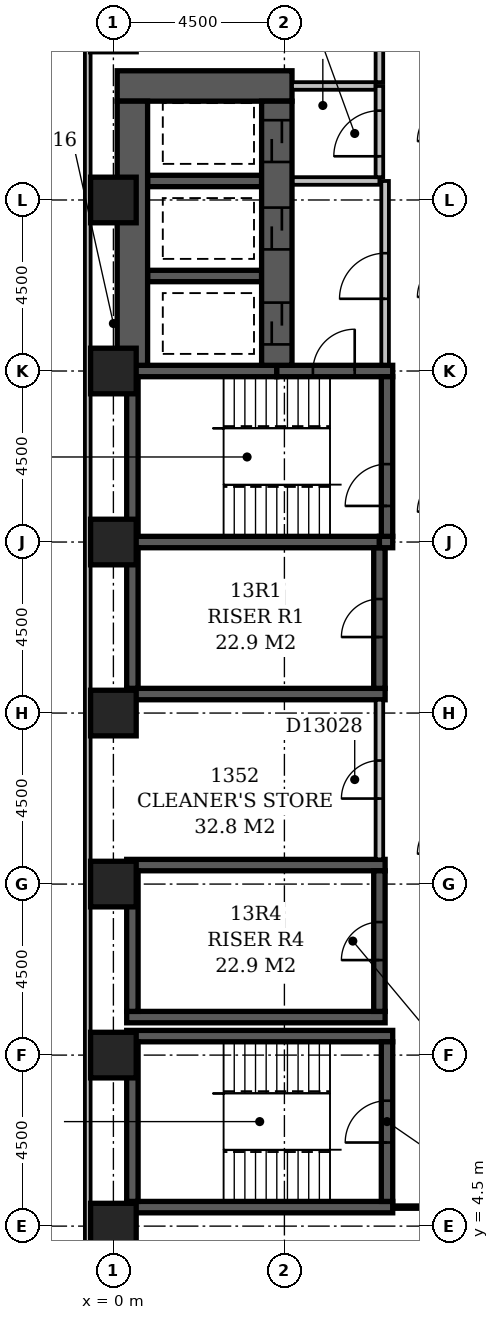
"""IFC4 building model, lengths in metres.
Left out: names, types, materials, properties, quantities, classifications, styles, units other than length and angle.
Written with IfcOpenShell. Run it as: python <this file> out.ifc"""

import sys

from ifc_helpers import new_model, si_unit, direction, frame, frame_2d, origin, origin_2d, place, context, subcontext, project, spatial, rectangle, extrude, element, fill, save


model = new_model("IFC4")
c1 = context("Model", 3, precision=1e-05, world=origin(), true_north=direction((0.0, 1.0)))
c2 = subcontext(c1, "Body", "Model", "MODEL_VIEW")
j1 = project(units=[si_unit("LENGTHUNIT", "METRE"), si_unit("PLANEANGLEUNIT", "RADIAN")], contexts=[c1])
p1 = place(None, origin())
s1 = spatial("IfcSite", under=j1, at=p1, CompositionType="ELEMENT")
p2 = place(p1, origin())
s2 = spatial("IfcBuilding", under=s1, at=p2, CompositionType="ELEMENT")
p3 = place(p2, frame((0.0, 0.0, 57.8)))
s3 = spatial("IfcBuildingStorey", under=s2, at=p3, CompositionType="ELEMENT", Elevation=57.8)
p4 = place(p3, frame((0.1, 34.5, -0.3), z_axis=(0.0, 0.0, 1.0), x_axis=(1.0, 0.0, 0.0)))
e1 = element("IfcWall", 1, at=p4, inside=s3, PredefinedType="SHEAR", context=c2, shape_type="SweptSolid", body=[
    extrude(rectangle(XDim=4.6, YDim=0.8, at=frame_2d((2.3, 0.0))), origin(), (0.0, 0.0, 1.0), 3.6),
])
for number, where, z_axis, x_axis in (
    (2, (0.35, 5.0, -0.3), (0.0, 0.0, 1.0), (1.0, 0.0, 0.0)),
    (3, (0.35, 9.5, -0.3), (0.0, 0.0, 1.0), (1.0, 0.0, 0.0)),
):
    element("IfcWall", number, at=place(p3, frame(where, z_axis=z_axis, x_axis=x_axis)), inside=s3, PredefinedType="SHEAR", context=c2, shape_type="SweptSolid", body=[
        extrude(rectangle(XDim=7.0, YDim=0.3, at=frame_2d((3.5, 0.0))), origin(), (0.0, 0.0, 1.0), 3.6),
    ])
for number, where, z_axis, x_axis in (
    (4, (0.35, 10.0, -0.3), (0.0, 0.0, 1.0), (1.0, 0.0, 0.0)),
    (5, (0.35, 14.0, -0.3), (0.0, 0.0, 1.0), (1.0, 0.0, 0.0)),
    (6, (0.35, 18.5, -0.3), (0.0, 0.0, 1.0), (1.0, 0.0, 0.0)),
):
    element("IfcWall", number, at=place(p3, frame(where, z_axis=z_axis, x_axis=x_axis)), inside=s3, PredefinedType="SHEAR", context=c2, shape_type="SweptSolid", body=[
        extrude(rectangle(XDim=6.8, YDim=0.3, at=frame_2d((3.4, 0.0))), origin(), (0.0, 0.0, 1.0), 3.6),
    ])
p5 = place(p3, frame((0.35, 22.5, -0.3), z_axis=(0.0, 0.0, 1.0), x_axis=(1.0, 0.0, 0.0)))
e7 = element("IfcWall", 7, at=p5, inside=s3, PredefinedType="SHEAR", context=c2, shape_type="SweptSolid", body=[
    extrude(rectangle(XDim=6.65, YDim=0.3, at=frame_2d((3.325, 0.0))), origin(), (0.0, 0.0, 1.0), 3.6),
])
p6 = place(p3, frame((0.35, 27.0, -0.3), z_axis=(0.0, 0.0, 1.0), x_axis=(1.0, 0.0, 0.0)))
e8 = element("IfcWall", 8, at=p6, inside=s3, PredefinedType="SHEAR", context=c2, shape_type="SweptSolid", body=[
    extrude(rectangle(XDim=3.95, YDim=0.3, at=frame_2d((1.975, 0.0))), origin(), (0.0, 0.0, 1.0), 3.6),
])
p7 = place(p3, frame((0.5, 5.15, -0.3), z_axis=(0.0, 0.0, 1.0), x_axis=(0.0, 1.0, 0.0)))
e9 = element("IfcWall", 9, at=p7, inside=s3, PredefinedType="SHEAR", context=c2, shape_type="SweptSolid", body=[
    extrude(rectangle(XDim=4.2, YDim=0.3, at=frame_2d((2.1, 0.0))), origin(), (0.0, 0.0, 1.0), 3.6),
])
for number, where, z_axis, x_axis in (
    (10, (0.5, 10.15, -0.3), (0.0, 0.0, 1.0), (0.0, 1.0, 0.0)),
    (11, (0.5, 18.65, -0.3), (0.0, 0.0, 1.0), (0.0, 1.0, 0.0)),
):
    element("IfcWall", number, at=place(p3, frame(where, z_axis=z_axis, x_axis=x_axis)), inside=s3, PredefinedType="SHEAR", context=c2, shape_type="SweptSolid", body=[
        extrude(rectangle(XDim=3.7, YDim=0.3, at=frame_2d((1.85, 0.0))), origin(), (0.0, 0.0, 1.0), 3.6),
    ])
p8 = place(p3, frame((0.5, 22.65, -0.3), z_axis=(0.0, 0.0, 1.0), x_axis=(0.0, 1.0, 0.0)))
e12 = element("IfcWall", 12, at=p8, inside=s3, PredefinedType="SHEAR", context=c2, shape_type="SweptSolid", body=[
    extrude(rectangle(XDim=4.2, YDim=0.3, at=frame_2d((2.1, 0.0))), origin(), (0.0, 0.0, 1.0), 3.6),
])
p9 = place(p3, frame((0.5, 27.15, -0.3), z_axis=(0.0, 0.0, 1.0), x_axis=(0.0, 1.0, 0.0)))
e13 = element("IfcWall", 13, at=p9, inside=s3, PredefinedType="SHEAR", context=c2, shape_type="SweptSolid", body=[
    extrude(rectangle(XDim=6.95, YDim=0.8, at=frame_2d((3.475, 0.0))), origin(), (0.0, 0.0, 1.0), 3.6),
])
for number, where, z_axis, x_axis in (
    (14, (0.9, 29.5, -0.3), (0.0, 0.0, 1.0), (1.0, 0.0, 0.0)),
    (15, (0.9, 32.0, -0.3), (0.0, 0.0, 1.0), (1.0, 0.0, 0.0)),
):
    element("IfcWall", number, at=place(p3, frame(where, z_axis=z_axis, x_axis=x_axis)), inside=s3, PredefinedType="SHEAR", context=c2, shape_type="SweptSolid", body=[
        extrude(rectangle(XDim=3.0, YDim=0.3, at=frame_2d((1.5, 0.0))), origin(), (0.0, 0.0, 1.0), 3.6),
    ])
p10 = place(p3, frame((4.3, 27.0, -0.3), z_axis=(0.0, 0.0, 1.0), x_axis=(1.0, 0.0, 0.0)))
e16 = element("IfcWall", 16, at=p10, inside=s3, PredefinedType="SHEAR", context=c2, shape_type="SweptSolid", body=[
    extrude(rectangle(XDim=3.05, YDim=0.3, at=frame_2d((1.525, 0.0))), origin(), (0.0, 0.0, 1.0), 3.6),
])
p11 = place(p10, frame((0.95, 0.0, 0.3)))
e17 = element("IfcOpeningElement", 17, at=p11, cuts=e16, PredefinedType="OPENING", context=c2, shape_type="SweptSolid", body=[
    extrude(rectangle(XDim=1.1, YDim=2.1, at=frame_2d((0.55, 1.05))), frame((0.0, 0.162, 0.0), z_axis=(0.0, -1.0, 0.0), x_axis=(1.0, 0.0, 0.0)), (0.0, 0.0, 1.0), 0.324),
])
p12 = place(p3, frame((4.3, 27.15, -0.3), z_axis=(0.0, 0.0, 1.0), x_axis=(0.0, 1.0, 0.0)))
e18 = element("IfcWall", 18, at=p12, inside=s3, PredefinedType="SHEAR", context=c2, shape_type="SweptSolid", body=[
    extrude(rectangle(XDim=6.95, YDim=0.8, at=frame_2d((3.475, 0.0))), origin(), (0.0, 0.0, 1.0), 3.6),
])
p13 = place(p12, frame((3.05, 0.0, 0.3)))
e19 = element("IfcOpeningElement", 19, at=p13, cuts=e18, PredefinedType="OPENING", context=c2, shape_type="SweptSolid", body=[
    extrude(rectangle(XDim=1.1, YDim=2.1, at=frame_2d((0.55, 1.05))), frame((0.0, 0.412, 0.0), z_axis=(0.0, -1.0, 0.0), x_axis=(1.0, 0.0, 0.0)), (0.0, 0.0, 1.0), 0.824),
])
p14 = place(p12, frame((0.55, 0.0, 0.3)))
e20 = element("IfcOpeningElement", 20, at=p14, cuts=e18, PredefinedType="OPENING", context=c2, shape_type="SweptSolid", body=[
    extrude(rectangle(XDim=1.1, YDim=2.1, at=frame_2d((0.55, 1.05))), frame((0.0, 0.412, 0.0), z_axis=(0.0, -1.0, 0.0), x_axis=(1.0, 0.0, 0.0)), (0.0, 0.0, 1.0), 0.824),
])
p15 = place(p12, frame((5.35, 0.0, 0.3)))
e21 = element("IfcOpeningElement", 21, at=p15, cuts=e18, PredefinedType="OPENING", context=c2, shape_type="SweptSolid", body=[
    extrude(rectangle(XDim=1.1, YDim=2.1, at=frame_2d((0.55, 1.05))), frame((0.0, 0.412, 0.0), z_axis=(0.0, -1.0, 0.0), x_axis=(1.0, 0.0, 0.0)), (0.0, 0.0, 1.0), 0.824),
])
p16 = place(p3, frame((7.0, 10.15, -0.3), z_axis=(0.0, 0.0, 1.0), x_axis=(0.0, 1.0, 0.0)))
e22 = element("IfcWall", 22, at=p16, inside=s3, PredefinedType="SHEAR", context=c2, shape_type="SweptSolid", body=[
    extrude(rectangle(XDim=3.7, YDim=0.3, at=frame_2d((1.85, 0.0))), origin(), (0.0, 0.0, 1.0), 3.6),
])
p17 = place(p16, frame((1.35, 0.0, 0.3)))
e23 = element("IfcOpeningElement", 23, at=p17, cuts=e22, PredefinedType="OPENING", context=c2, shape_type="SweptSolid", body=[
    extrude(rectangle(XDim=1.0, YDim=2.1, at=frame_2d((0.5, 1.05))), frame((0.0, 0.162, 0.0), z_axis=(0.0, -1.0, 0.0), x_axis=(1.0, 0.0, 0.0)), (0.0, 0.0, 1.0), 0.324),
])
p18 = place(p3, frame((7.0, 18.65, -0.3), z_axis=(0.0, 0.0, 1.0), x_axis=(0.0, 1.0, 0.0)))
e24 = element("IfcWall", 24, at=p18, inside=s3, PredefinedType="SHEAR", context=c2, shape_type="SweptSolid", body=[
    extrude(rectangle(XDim=3.7, YDim=0.3, at=frame_2d((1.85, 0.0))), origin(), (0.0, 0.0, 1.0), 3.6),
])
p19 = place(p18, frame((1.35, 0.0, 0.3)))
e25 = element("IfcOpeningElement", 25, at=p19, cuts=e24, PredefinedType="OPENING", context=c2, shape_type="SweptSolid", body=[
    extrude(rectangle(XDim=1.0, YDim=2.1, at=frame_2d((0.5, 1.05))), frame((0.0, 0.162, 0.0), z_axis=(0.0, -1.0, 0.0), x_axis=(1.0, 0.0, 0.0)), (0.0, 0.0, 1.0), 0.324),
])
p20 = place(p3, frame((7.0, 22.5, -0.3), z_axis=(0.0, 0.0, 1.0), x_axis=(1.0, 0.0, 0.0)))
e26 = element("IfcWall", 26, at=p20, inside=s3, PredefinedType="SHEAR", context=c2, shape_type="SweptSolid", body=[
    extrude(rectangle(XDim=0.35, YDim=0.3, at=frame_2d((0.175, 0.0))), origin(), (0.0, 0.0, 1.0), 3.6),
])
p21 = place(p3, frame((7.2, 5.15, -0.3), z_axis=(0.0, 0.0, 1.0), x_axis=(0.0, 1.0, 0.0)))
e27 = element("IfcWall", 27, at=p21, inside=s3, PredefinedType="SHEAR", context=c2, shape_type="SweptSolid", body=[
    extrude(rectangle(XDim=4.2, YDim=0.3, at=frame_2d((2.1, 0.0))), origin(), (0.0, 0.0, 1.0), 3.6),
])
p22 = place(p21, frame((1.55, 0.0, 0.3)))
e28 = element("IfcOpeningElement", 28, at=p22, cuts=e27, PredefinedType="OPENING", context=c2, shape_type="SweptSolid", body=[
    extrude(rectangle(XDim=1.1, YDim=2.1, at=frame_2d((0.55, 1.05))), frame((0.0, 0.162, 0.0), z_axis=(0.0, -1.0, 0.0), x_axis=(1.0, 0.0, 0.0)), (0.0, 0.0, 1.0), 0.324),
])
p23 = place(p3, frame((7.2, 22.65, -0.3), z_axis=(0.0, 0.0, 1.0), x_axis=(0.0, 1.0, 0.0)))
e29 = element("IfcWall", 29, at=p23, inside=s3, PredefinedType="SHEAR", context=c2, shape_type="SweptSolid", body=[
    extrude(rectangle(XDim=4.2, YDim=0.3, at=frame_2d((2.1, 0.0))), origin(), (0.0, 0.0, 1.0), 3.6),
])
p24 = place(p23, frame((0.8, 0.0, 0.3)))
e30 = element("IfcOpeningElement", 30, at=p24, cuts=e29, PredefinedType="OPENING", context=c2, shape_type="SweptSolid", body=[
    extrude(rectangle(XDim=1.1, YDim=2.1, at=frame_2d((0.55, 1.05))), frame((0.0, 0.162, 0.0), z_axis=(0.0, -1.0, 0.0), x_axis=(1.0, 0.0, 0.0)), (0.0, 0.0, 1.0), 0.324),
])
for number, where, z_axis, x_axis in (
    (31, (0.0, 4.5, -0.3), (0.0, 0.0, 1.0), (1.0, 0.0, 0.0)),
    (32, (0.0, 9.0, -0.3), (0.0, 0.0, 1.0), (1.0, 0.0, 0.0)),
    (33, (0.0, 13.5, -0.3), (0.0, 0.0, 1.0), (1.0, 0.0, 0.0)),
    (34, (0.0, 18.0, -0.3), (0.0, 0.0, 1.0), (1.0, 0.0, 0.0)),
    (35, (0.0, 22.5, -0.3), (0.0, 0.0, 1.0), (1.0, 0.0, 0.0)),
    (36, (0.0, 27.0, -0.3), (0.0, 0.0, 1.0), (1.0, 0.0, 0.0)),
    (37, (0.0, 31.5, -0.3), (0.0, 0.0, 1.0), (1.0, 0.0, 0.0)),
):
    element("IfcColumn", number, at=place(p3, frame(where, z_axis=z_axis, x_axis=x_axis)), inside=s3, PredefinedType="COLUMN", context=c2, shape_type="SweptSolid", body=[
        extrude(rectangle(XDim=1.2, YDim=1.2, at=origin_2d()), origin(), (0.0, 0.0, 1.0), 3.6),
    ])
p25 = place(p3, frame((-0.675, 59.1, 0.0), z_axis=(0.0, 0.0, 1.0), x_axis=(0.0, -1.0, 0.0)))
e38 = element("IfcWall", 38, at=p25, inside=s3, PredefinedType="STANDARD", context=c2, shape_type="SweptSolid", body=[
    extrude(rectangle(XDim=55.35, YDim=0.15, at=frame_2d((27.675, 0.0))), origin(), (0.0, 0.0, 1.0), 2.7),
])
p26 = place(p25, frame((10.65, 0.0, 0.6)))
e39 = element("IfcOpeningElement", 39, at=p26, cuts=e38, PredefinedType="OPENING", context=c2, shape_type="SweptSolid", body=[
    extrude(rectangle(XDim=2.4, YDim=1.8, at=frame_2d((1.2, 0.9))), frame((0.0, 0.087, 0.0), z_axis=(0.0, -1.0, 0.0), x_axis=(1.0, 0.0, 0.0)), (0.0, 0.0, 1.0), 0.174),
])
p27 = place(p25, frame((15.15, 0.0, 0.6)))
e40 = element("IfcOpeningElement", 40, at=p27, cuts=e38, PredefinedType="OPENING", context=c2, shape_type="SweptSolid", body=[
    extrude(rectangle(XDim=2.4, YDim=1.8, at=frame_2d((1.2, 0.9))), frame((0.0, 0.087, 0.0), z_axis=(0.0, -1.0, 0.0), x_axis=(1.0, 0.0, 0.0)), (0.0, 0.0, 1.0), 0.174),
])
p28 = place(p25, frame((19.523, 0.0, 0.6)))
e41 = element("IfcOpeningElement", 41, at=p28, cuts=e38, PredefinedType="OPENING", context=c2, shape_type="SweptSolid", body=[
    extrude(rectangle(XDim=1.2, YDim=1.8, at=frame_2d((0.6, 0.9))), frame((0.0, 0.087, 0.0), z_axis=(0.0, -1.0, 0.0), x_axis=(1.0, 0.0, 0.0)), (0.0, 0.0, 1.0), 0.174),
])
p29 = place(p3, frame((4.72, 32.0, 0.0), z_axis=(0.0, 0.0, 1.0), x_axis=(1.0, 0.0, 0.0)))
e42 = element("IfcWall", 42, at=p29, inside=s3, PredefinedType="PARTITIONING", context=c2, shape_type="SweptSolid", body=[
    extrude(rectangle(XDim=2.28, YDim=0.2, at=frame_2d((1.14, 0.0))), origin(), (0.0, 0.0, 1.0), 3.3),
])
p30 = place(p3, frame((7.0, 32.1, 0.0), z_axis=(0.0, 0.0, 1.0), x_axis=(0.0, 1.0, 0.0)))
e43 = element("IfcWall", 43, at=p30, inside=s3, PredefinedType="PARTITIONING", context=c2, shape_type="SweptSolid", body=[
    extrude(rectangle(XDim=2.4, YDim=0.2, at=frame_2d((1.2, 0.0))), origin(), (0.0, 0.0, 1.0), 3.3),
])
p31 = place(p30, frame((0.55, 0.0, 0.0)))
e44 = element("IfcOpeningElement", 44, at=p31, cuts=e43, PredefinedType="OPENING", context=c2, shape_type="SweptSolid", body=[
    extrude(rectangle(XDim=1.2, YDim=2.1, at=frame_2d((0.6, 1.05))), frame((0.0, 0.112, 0.0), z_axis=(0.0, -1.0, 0.0), x_axis=(1.0, 0.0, 0.0)), (0.0, 0.0, 1.0), 0.224),
])
p32 = place(p3, frame((4.7, 34.5, 0.0), z_axis=(0.0, 0.0, 1.0), x_axis=(1.0, 0.0, 0.0)))
e45 = element("IfcWall", 45, at=p32, inside=s3, PredefinedType="PARTITIONING", context=c2, shape_type="SweptSolid", body=[
    extrude(rectangle(XDim=2.2, YDim=0.2, at=frame_2d((1.1, 0.0))), origin(), (0.0, 0.0, 1.0), 3.3),
])
p33 = place(p3, frame((7.15, 27.17, 0.0), z_axis=(0.0, 0.0, 1.0), x_axis=(0.0, 1.0, 0.0)))
e46 = element("IfcWall", 46, at=p33, inside=s3, PredefinedType="PARTITIONING", context=c2, shape_type="SweptSolid", body=[
    extrude(rectangle(XDim=4.83, YDim=0.2, at=frame_2d((2.415, 0.0))), origin(), (0.0, 0.0, 1.0), 3.3),
])
p34 = place(p33, frame((1.73, 0.0, 0.0)))
e47 = element("IfcOpeningElement", 47, at=p34, cuts=e46, PredefinedType="OPENING", context=c2, shape_type="SweptSolid", body=[
    extrude(rectangle(XDim=1.2, YDim=2.1, at=frame_2d((0.6, 1.05))), frame((0.0, 0.112, 0.0), z_axis=(0.0, -1.0, 0.0), x_axis=(1.0, 0.0, 0.0)), (0.0, 0.0, 1.0), 0.224),
])
p35 = place(p3, frame((0.0, 4.4, 0.0), z_axis=(0.0, 0.0, 1.0), x_axis=(0.0, 1.0, 0.0)))
e48 = element("IfcWall", 48, at=p35, inside=s3, PredefinedType="PARTITIONING", context=c2, shape_type="SweptSolid", body=[
    extrude(rectangle(XDim=0.7, YDim=0.1, at=frame_2d((0.35, 0.0))), origin(), (0.0, 0.0, 1.0), 2.7),
])
p36 = place(p3, frame((7.349, 5.0, 0.0), z_axis=(0.0, 0.0, 1.0), x_axis=(1.0, 0.0, 0.0)))
e49 = element("IfcWall", 49, at=p36, inside=s3, PredefinedType="PARTITIONING", context=c2, shape_type="SweptSolid", body=[
    extrude(rectangle(XDim=1.551, YDim=0.1, at=frame_2d((0.775, 0.0))), origin(), (0.0, 0.0, 1.0), 3.3),
])
p37 = place(p3, frame((7.0, 14.15, 0.0), z_axis=(0.0, 0.0, 1.0), x_axis=(0.0, 1.0, 0.0)))
e50 = element("IfcWall", 50, at=p37, inside=s3, PredefinedType="PARTITIONING", context=c2, shape_type="SweptSolid", body=[
    extrude(rectangle(XDim=4.2, YDim=0.2, at=frame_2d((2.1, 0.0))), origin(), (0.0, 0.0, 1.0), 3.3),
])
p38 = place(p37, frame((1.6, 0.0, 0.0)))
e51 = element("IfcOpeningElement", 51, at=p38, cuts=e50, PredefinedType="OPENING", context=c2, shape_type="SweptSolid", body=[
    extrude(rectangle(XDim=1.0, YDim=2.1, at=frame_2d((0.5, 1.05))), frame((0.0, 0.112, 0.0), z_axis=(0.0, -1.0, 0.0), x_axis=(1.0, 0.0, 0.0)), (0.0, 0.0, 1.0), 0.224),
])
p39 = place(p3, frame((7.0, 34.6, 0.0), z_axis=(0.0, 0.0, 1.0), x_axis=(0.0, 1.0, 0.0)))
e52 = element("IfcWall", 52, at=p39, inside=s3, PredefinedType="PARTITIONING", context=c2, shape_type="SweptSolid", body=[
    extrude(rectangle(XDim=14.8, YDim=0.2, at=frame_2d((7.4, 0.0))), origin(), (0.0, 0.0, 1.0), 3.3),
])
p40 = place(p39, frame((6.95, 0.0, 0.0)))
e53 = element("IfcOpeningElement", 53, at=p40, cuts=e52, PredefinedType="OPENING", context=c2, shape_type="SweptSolid", body=[
    extrude(rectangle(XDim=0.9, YDim=2.1, at=frame_2d((0.45, 1.05))), frame((0.0, 0.112, 0.0), z_axis=(0.0, -1.0, 0.0), x_axis=(1.0, 0.0, 0.0)), (0.0, 0.0, 1.0), 0.224),
])
p41 = place(p34, origin())
e54 = element("IfcDoor", 54, at=p41, inside=s3, OperationType="SINGLE_SWING_LEFT", PredefinedType="DOOR", context=c2, shape_type="SweptSolid", body=[
    extrude(rectangle(XDim=1.2, YDim=2.1, at=frame_2d((0.6, 1.05))), frame((0.0, 0.025, 0.0), z_axis=(0.0, -1.0, 0.0), x_axis=(1.0, 0.0, 0.0)), (0.0, 0.0, 1.0), 0.05),
])
fill(e47, e54)
p42 = place(p13, origin())
e55 = element("IfcDoor", 55, at=p42, inside=s3, OperationType="SLIDING_TO_LEFT", PredefinedType="DOOR", context=c2, shape_type="SweptSolid", body=[
    extrude(rectangle(XDim=1.1, YDim=2.1, at=frame_2d((0.55, 1.05))), frame((0.0, 0.025, 0.0), z_axis=(0.0, -1.0, 0.0), x_axis=(1.0, 0.0, 0.0)), (0.0, 0.0, 1.0), 0.05),
])
fill(e19, e55)
p43 = place(p14, origin())
e56 = element("IfcDoor", 56, at=p43, inside=s3, OperationType="SLIDING_TO_LEFT", PredefinedType="DOOR", context=c2, shape_type="SweptSolid", body=[
    extrude(rectangle(XDim=1.1, YDim=2.1, at=frame_2d((0.55, 1.05))), frame((0.0, 0.025, 0.0), z_axis=(0.0, -1.0, 0.0), x_axis=(1.0, 0.0, 0.0)), (0.0, 0.0, 1.0), 0.05),
])
fill(e20, e56)
p44 = place(p31, origin())
e57 = element("IfcDoor", 57, at=p44, inside=s3, OperationType="SINGLE_SWING_LEFT", PredefinedType="DOOR", context=c2, shape_type="SweptSolid", body=[
    extrude(rectangle(XDim=1.2, YDim=2.1, at=frame_2d((0.6, 1.05))), frame((0.0, 0.025, 0.0), z_axis=(0.0, -1.0, 0.0), x_axis=(1.0, 0.0, 0.0)), (0.0, 0.0, 1.0), 0.05),
])
fill(e44, e57)
p45 = place(p15, origin())
e58 = element("IfcDoor", 58, at=p45, inside=s3, OperationType="SLIDING_TO_LEFT", PredefinedType="DOOR", context=c2, shape_type="SweptSolid", body=[
    extrude(rectangle(XDim=1.1, YDim=2.1, at=frame_2d((0.55, 1.05))), frame((0.0, 0.025, 0.0), z_axis=(0.0, -1.0, 0.0), x_axis=(1.0, 0.0, 0.0)), (0.0, 0.0, 1.0), 0.05),
])
fill(e21, e58)
p46 = place(p19, origin())
e59 = element("IfcDoor", 59, at=p46, inside=s3, OperationType="SINGLE_SWING_LEFT", PredefinedType="DOOR", context=c2, shape_type="SweptSolid", body=[
    extrude(rectangle(XDim=1.0, YDim=2.1, at=frame_2d((0.5, 1.05))), frame((0.0, 0.025, 0.0), z_axis=(0.0, -1.0, 0.0), x_axis=(1.0, 0.0, 0.0)), (0.0, 0.0, 1.0), 0.05),
])
fill(e25, e59)
p47 = place(p17, origin())
e60 = element("IfcDoor", 60, at=p47, inside=s3, OperationType="SINGLE_SWING_LEFT", PredefinedType="DOOR", context=c2, shape_type="SweptSolid", body=[
    extrude(rectangle(XDim=1.0, YDim=2.1, at=frame_2d((0.5, 1.05))), frame((0.0, 0.025, 0.0), z_axis=(0.0, -1.0, 0.0), x_axis=(1.0, 0.0, 0.0)), (0.0, 0.0, 1.0), 0.05),
])
fill(e23, e60)
p48 = place(p11, frame((1.1, 0.0, 0.0), z_axis=(0.0, 0.0, 1.0), x_axis=(-1.0, 0.0, 0.0)))
e61 = element("IfcDoor", 61, at=p48, inside=s3, OperationType="SINGLE_SWING_LEFT", PredefinedType="DOOR", context=c2, shape_type="SweptSolid", body=[
    extrude(rectangle(XDim=1.1, YDim=2.1, at=frame_2d((0.55, 1.05))), frame((0.0, 0.025, 0.0), z_axis=(0.0, -1.0, 0.0), x_axis=(1.0, 0.0, 0.0)), (0.0, 0.0, 1.0), 0.05),
])
fill(e17, e61)
p49 = place(p24, origin())
e62 = element("IfcDoor", 62, at=p49, inside=s3, OperationType="SINGLE_SWING_LEFT", PredefinedType="DOOR", context=c2, shape_type="SweptSolid", body=[
    extrude(rectangle(XDim=1.1, YDim=2.1, at=frame_2d((0.55, 1.05))), frame((0.0, 0.025, 0.0), z_axis=(0.0, -1.0, 0.0), x_axis=(1.0, 0.0, 0.0)), (0.0, 0.0, 1.0), 0.05),
])
fill(e30, e62)
p50 = place(p22, origin())
e63 = element("IfcDoor", 63, at=p50, inside=s3, OperationType="SINGLE_SWING_LEFT", PredefinedType="DOOR", context=c2, shape_type="SweptSolid", body=[
    extrude(rectangle(XDim=1.1, YDim=2.1, at=frame_2d((0.55, 1.05))), frame((0.0, 0.025, 0.0), z_axis=(0.0, -1.0, 0.0), x_axis=(1.0, 0.0, 0.0)), (0.0, 0.0, 1.0), 0.05),
])
fill(e28, e63)
p51 = place(p38, origin())
e64 = element("IfcDoor", 64, at=p51, inside=s3, OperationType="SINGLE_SWING_LEFT", PredefinedType="DOOR", context=c2, shape_type="SweptSolid", body=[
    extrude(rectangle(XDim=1.0, YDim=2.1, at=frame_2d((0.5, 1.05))), frame((0.0, 0.025, 0.0), z_axis=(0.0, -1.0, 0.0), x_axis=(1.0, 0.0, 0.0)), (0.0, 0.0, 1.0), 0.05),
])
fill(e51, e64)
save(model, sys.argv[1])
